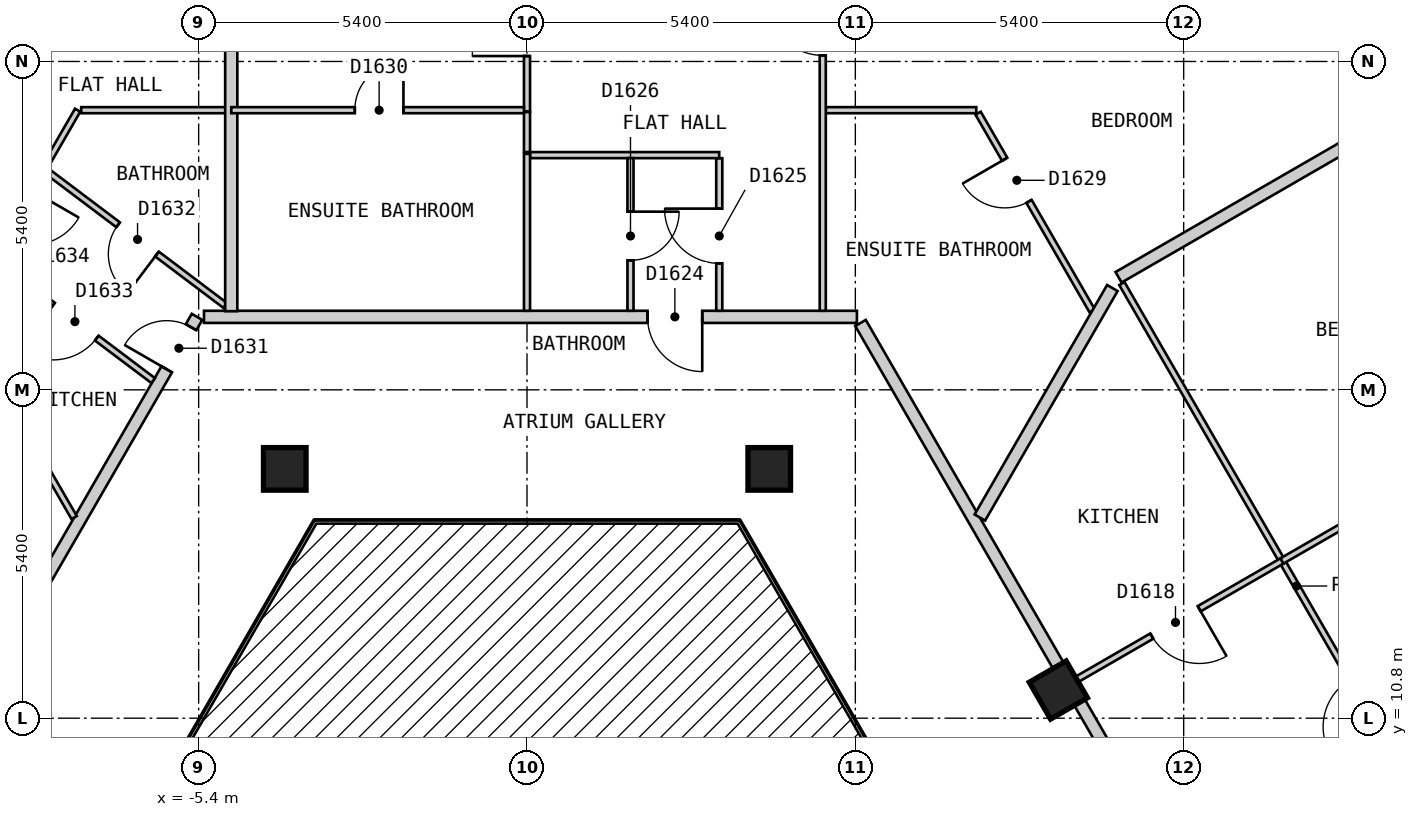
"""IFC4 building model, lengths in metres.
Left out: names, types, materials, properties, quantities, classifications, styles, units other than length and angle.
Written with IfcOpenShell. Run it as: python <this file> out.ifc"""

import sys

from ifc_helpers import new_model, si_unit, direction, frame, frame_2d, origin, origin_2d, place, context, subcontext, project, spatial, polyline, rectangle, outline, extrude, element, fill, save


model = new_model("IFC4")
c1 = context("Model", 3, precision=1e-05, world=origin(), true_north=direction((0.0, 1.0)))
c2 = subcontext(c1, "Body", "Model", "MODEL_VIEW")
j1 = project(units=[si_unit("LENGTHUNIT", "METRE"), si_unit("PLANEANGLEUNIT", "RADIAN")], contexts=[c1])
p1 = place(None, origin())
s1 = spatial("IfcSite", under=j1, at=p1, CompositionType="ELEMENT")
p2 = place(p1, origin())
s2 = spatial("IfcBuilding", under=s1, at=p2, CompositionType="ELEMENT")
p3 = place(p2, frame((0.0, 0.0, 169.2)))
s3 = spatial("IfcBuildingStorey", under=s2, at=p3, CompositionType="ELEMENT", Elevation=169.2)
for number, where, z_axis, x_axis in (
    (1, (8.739, 11.263, 0.0), (0.0, 0.0, 1.0), (-0.5, 0.866, 0.0)),
    (2, (3.984, 14.9, 0.0), (0.0, 0.0, 1.0), (1.0, 0.0, 0.0)),
    (3, (-3.984, 14.9, 0.0), (0.0, 0.0, 1.0), (1.0, 0.0, 0.0)),
):
    element("IfcColumn", number, at=place(p3, frame(where, z_axis=z_axis, x_axis=x_axis)), inside=s3, PredefinedType="COLUMN", context=c2, shape_type="SweptSolid", body=[
        extrude(rectangle(XDim=0.7, YDim=0.7, at=origin_2d()), origin(), (0.0, 0.0, 1.0), 3.0),
    ])
p4 = place(p3, frame((14.647, 21.57, 0.0), z_axis=(0.0, 0.0, 1.0), x_axis=(-0.866022959057, 0.500004234368, 0.0)))
e4 = element("IfcWall", 4, at=p4, inside=s3, PredefinedType="SOLIDWALL", context=c2, shape_type="SweptSolid", body=[
    extrude(outline(polyline([(0.0, -0.15), (5.0, -0.15), (4.92, 0.15), (0.08, 0.15), (0.0, -0.15)])), origin(), (0.0, 0.0, 1.0), 2.7),
])
p5 = place(p4, frame((0.65, 0.0, 0.15)))
e5 = element("IfcOpeningElement", 5, at=p5, cuts=e4, PredefinedType="OPENING", context=c2, shape_type="SweptSolid", body=[
    extrude(rectangle(XDim=1.2, YDim=2.1, at=frame_2d((0.6, 1.05))), frame((0.0, 0.16, 0.0), z_axis=(0.0, -1.0, 0.0), x_axis=(1.0, 0.0, 0.0)), (0.0, 0.0, 1.0), 0.32),
])
p6 = place(p3, frame((5.485, 17.3, 0.0), z_axis=(0.0, 0.0, 1.0), x_axis=(0.499965832213, -0.866045129667, 0.0)))
e6 = element("IfcWall", 6, at=p6, inside=s3, PredefinedType="PARTITIONING", context=c2, shape_type="SweptSolid", body=[
    extrude(rectangle(XDim=10.739, YDim=0.2, at=frame_2d((5.369, 0.0))), origin(), (0.0, 0.0, 1.0), 2.7),
])
p7 = place(p6, frame((9.047, 0.0, 0.0)))
e7 = element("IfcOpeningElement", 7, at=p7, cuts=e6, PredefinedType="OPENING", context=c2, shape_type="SweptSolid", body=[
    extrude(rectangle(XDim=1.0, YDim=2.1, at=frame_2d((0.5, 1.05))), frame((0.0, 0.11, 0.0), z_axis=(0.0, -1.0, 0.0), x_axis=(1.0, 0.0, 0.0)), (0.0, 0.0, 1.0), 0.22),
])
p8 = place(p3, frame((-5.312, 17.4, 0.0), z_axis=(0.0, 0.0, 1.0), x_axis=(1.0, 0.0, 0.0)))
e8 = element("IfcWall", 8, at=p8, inside=s3, PredefinedType="PARTITIONING", context=c2, shape_type="SweptSolid", body=[
    extrude(rectangle(XDim=10.738, YDim=0.2, at=frame_2d((5.369, 0.0))), origin(), (0.0, 0.0, 1.0), 2.7),
])
p9 = place(p8, frame((7.294, 0.0, 0.0)))
e9 = element("IfcOpeningElement", 9, at=p9, cuts=e8, PredefinedType="OPENING", context=c2, shape_type="SweptSolid", body=[
    extrude(rectangle(XDim=0.9, YDim=2.1, at=frame_2d((0.45, 1.05))), frame((0.0, 0.11, 0.0), z_axis=(0.0, -1.0, 0.0), x_axis=(1.0, 0.0, 0.0)), (0.0, 0.0, 1.0), 0.22),
])
p10 = place(p3, frame((-10.771, 8.144, 0.0), z_axis=(0.0, 0.0, 1.0), x_axis=(0.500008507724, 0.866020491792, 0.0)))
e10 = element("IfcWall", 10, at=p10, inside=s3, PredefinedType="PARTITIONING", context=c2, shape_type="SweptSolid", body=[
    extrude(rectangle(XDim=10.688, YDim=0.2, at=frame_2d((5.344, 0.0))), origin(), (0.0, 0.0, 1.0), 2.7),
])
p11 = place(p10, frame((9.692, 0.0, 0.0)))
e11 = element("IfcOpeningElement", 11, at=p11, cuts=e10, PredefinedType="OPENING", context=c2, shape_type="SweptSolid", body=[
    extrude(rectangle(XDim=0.8, YDim=2.1, at=frame_2d((0.4, 1.05))), frame((0.0, 0.11, 0.0), z_axis=(0.0, -1.0, 0.0), x_axis=(1.0, 0.0, 0.0)), (0.0, 0.0, 1.0), 0.22),
])
p12 = place(p10, frame((0.549, 0.0, 0.0)))
e12 = element("IfcOpeningElement", 12, at=p12, cuts=e10, PredefinedType="OPENING", context=c2, shape_type="SweptSolid", body=[
    extrude(rectangle(XDim=1.0, YDim=2.1, at=frame_2d((0.5, 1.05))), frame((0.0, 0.11, 0.0), z_axis=(0.0, -1.0, 0.0), x_axis=(1.0, 0.0, 0.0)), (0.0, 0.0, 1.0), 0.22),
])
p13 = place(p3, frame((7.419, 20.749, 0.0), z_axis=(0.0, 0.0, 1.0), x_axis=(0.499917691695, -0.866072919292, 0.0)))
e13 = element("IfcWall", 13, at=p13, inside=s3, PredefinedType="PARTITIONING", context=c2, shape_type="SweptSolid", body=[
    extrude(rectangle(XDim=3.753, YDim=0.1, at=frame_2d((1.876, 0.0))), origin(), (0.0, 0.0, 1.0), 2.7),
])
p14 = place(p13, frame((0.874, 0.0, 0.0)))
e14 = element("IfcOpeningElement", 14, at=p14, cuts=e13, PredefinedType="OPENING", context=c2, shape_type="SweptSolid", body=[
    extrude(rectangle(XDim=0.8, YDim=2.1, at=frame_2d((0.4, 1.05))), frame((0.0, 0.06, 0.0), z_axis=(0.0, -1.0, 0.0), x_axis=(1.0, 0.0, 0.0)), (0.0, 0.0, 1.0), 0.12),
])
p15 = place(p3, frame((9.784, 17.947, 0.0), z_axis=(0.0, 0.0, 1.0), x_axis=(0.500016228266, -0.866016034188, 0.0)))
e15 = element("IfcWall", 15, at=p15, inside=s3, PredefinedType="PARTITIONING", context=c2, shape_type="SweptSolid", body=[
    extrude(rectangle(XDim=11.486, YDim=0.1, at=frame_2d((5.743, 0.0))), origin(), (0.0, 0.0, 1.0), 2.7),
])
p16 = place(p15, frame((7.518, 0.0, 0.0)))
e16 = element("IfcOpeningElement", 16, at=p16, cuts=e15, PredefinedType="OPENING", context=c2, shape_type="SweptSolid", body=[
    extrude(rectangle(XDim=0.9, YDim=2.1, at=frame_2d((0.45, 1.05))), frame((0.0, 0.06, 0.0), z_axis=(0.0, -1.0, 0.0), x_axis=(1.0, 0.0, 0.0)), (0.0, 0.0, 1.0), 0.12),
])
p17 = place(p3, frame((0.0, 20.769, 0.0), z_axis=(0.0, 0.0, 1.0), x_axis=(0.0, -1.0, 0.0)))
e17 = element("IfcWall", 17, at=p17, inside=s3, PredefinedType="PARTITIONING", context=c2, shape_type="SweptSolid", body=[
    extrude(rectangle(XDim=0.659, YDim=0.1, at=frame_2d((0.33, 0.0))), origin(), (0.0, 0.0, 1.0), 2.7),
])
p18 = place(p3, frame((3.162, 20.009, 0.0), z_axis=(0.0, 0.0, 1.0), x_axis=(0.0, -1.0, 0.0)))
e18 = element("IfcWall", 18, at=p18, inside=s3, PredefinedType="PARTITIONING", context=c2, shape_type="SweptSolid", body=[
    extrude(rectangle(XDim=2.509, YDim=0.1, at=frame_2d((1.254, 0.0))), origin(), (0.0, 0.0, 1.0), 2.7),
])
p19 = place(p18, frame((0.829, 0.0, 0.0)))
e19 = element("IfcOpeningElement", 19, at=p19, cuts=e18, PredefinedType="OPENING", context=c2, shape_type="SweptSolid", body=[
    extrude(rectangle(XDim=0.9, YDim=2.1, at=frame_2d((0.45, 1.05))), frame((0.0, 0.06, 0.0), z_axis=(0.0, -1.0, 0.0), x_axis=(1.0, 0.0, 0.0)), (0.0, 0.0, 1.0), 0.12),
])
p20 = place(p3, frame((-8.763, 18.321, 0.0), z_axis=(0.0, 0.0, 1.0), x_axis=(0.798861914713, -0.601514456369, 0.0)))
e20 = element("IfcWall", 20, at=p20, inside=s3, PredefinedType="PARTITIONING", context=c2, shape_type="SweptSolid", body=[
    extrude(rectangle(XDim=3.273, YDim=0.1, at=frame_2d((1.637, 0.0))), origin(), (0.0, 0.0, 1.0), 2.7),
])
p21 = place(p20, frame((1.212, 0.0, 0.0)))
e21 = element("IfcOpeningElement", 21, at=p21, cuts=e20, PredefinedType="OPENING", context=c2, shape_type="SweptSolid", body=[
    extrude(rectangle(XDim=0.9, YDim=2.1, at=frame_2d((0.45, 1.05))), frame((0.0, 0.06, 0.0), z_axis=(0.0, -1.0, 0.0), x_axis=(1.0, 0.0, 0.0)), (0.0, 0.0, 1.0), 0.12),
])
p22 = place(p3, frame((-7.906, 19.804, 0.0), z_axis=(0.0, 0.0, 1.0), x_axis=(0.798741470056, -0.60167438371, 0.0)))
e22 = element("IfcWall", 22, at=p22, inside=s3, PredefinedType="PARTITIONING", context=c2, shape_type="SweptSolid", body=[
    extrude(rectangle(XDim=3.683, YDim=0.1, at=frame_2d((1.842, 0.0))), origin(), (0.0, 0.0, 1.0), 2.7),
])
p23 = place(p22, frame((1.479, 0.0, 0.0)))
e23 = element("IfcOpeningElement", 23, at=p23, cuts=e22, PredefinedType="OPENING", context=c2, shape_type="SweptSolid", body=[
    extrude(rectangle(XDim=0.8, YDim=2.1, at=frame_2d((0.4, 1.05))), frame((0.0, 0.06, 0.0), z_axis=(0.0, -1.0, 0.0), x_axis=(1.0, 0.0, 0.0)), (0.0, 0.0, 1.0), 0.12),
])
p24 = place(p3, frame((0.05, 20.06, 0.0), z_axis=(0.0, 0.0, 1.0), x_axis=(1.0, 0.0, 0.0)))
e24 = element("IfcWall", 24, at=p24, inside=s3, PredefinedType="PARTITIONING", context=c2, shape_type="SweptSolid", body=[
    extrude(rectangle(XDim=3.111, YDim=0.1, at=frame_2d((1.555, 0.0))), origin(), (0.0, 0.0, 1.0), 2.7),
])
p25 = place(p3, frame((-7.332, 20.799, 0.0), z_axis=(0.0, 0.0, 1.0), x_axis=(1.0, 0.0, 0.0)))
e25 = element("IfcWall", 25, at=p25, inside=s3, PredefinedType="PARTITIONING", context=c2, shape_type="SweptSolid", body=[
    extrude(rectangle(XDim=2.468, YDim=0.1, at=frame_2d((1.234, 0.0))), origin(), (0.0, 0.0, 1.0), 2.7),
])
p26 = place(p3, frame((4.914, 20.799, 0.0), z_axis=(0.0, 0.0, 1.0), x_axis=(1.0, 0.0, 0.0)))
e26 = element("IfcWall", 26, at=p26, inside=s3, PredefinedType="PARTITIONING", context=c2, shape_type="SweptSolid", body=[
    extrude(rectangle(XDim=2.475, YDim=0.1, at=frame_2d((1.237, 0.0))), origin(), (0.0, 0.0, 1.0), 2.7),
])
p27 = place(p3, frame((-11.806, 13.149, 0.0), z_axis=(0.0, 0.0, 1.0), x_axis=(0.499932199895, 0.866064544655, 0.0)))
e27 = element("IfcWall", 27, at=p27, inside=s3, PredefinedType="PARTITIONING", context=c2, shape_type="SweptSolid", body=[
    extrude(rectangle(XDim=8.833, YDim=0.1, at=frame_2d((4.417, 0.0))), origin(), (0.0, 0.0, 1.0), 2.7),
])
p28 = place(p27, frame((6.413, 0.0, 0.0)))
e28 = element("IfcOpeningElement", 28, at=p28, cuts=e27, PredefinedType="OPENING", context=c2, shape_type="SweptSolid", body=[
    extrude(rectangle(XDim=0.9, YDim=2.1, at=frame_2d((0.45, 1.05))), frame((0.0, 0.06, 0.0), z_axis=(0.0, -1.0, 0.0), x_axis=(1.0, 0.0, 0.0)), (0.0, 0.0, 1.0), 0.12),
])
p29 = place(p27, frame((2.004, 0.0, 0.0)))
e29 = element("IfcOpeningElement", 29, at=p29, cuts=e27, PredefinedType="OPENING", context=c2, shape_type="SweptSolid", body=[
    extrude(rectangle(XDim=0.8, YDim=2.1, at=frame_2d((0.4, 1.05))), frame((0.0, 0.06, 0.0), z_axis=(0.0, -1.0, 0.0), x_axis=(1.0, 0.0, 0.0)), (0.0, 0.0, 1.0), 0.12),
])
p30 = place(p3, frame((4.864, 17.5, 0.0), z_axis=(0.0, 0.0, 1.0), x_axis=(0.0, 1.0, 0.0)))
e30 = element("IfcWall", 30, at=p30, inside=s3, PredefinedType="PARTITIONING", context=c2, shape_type="SweptSolid", body=[
    extrude(rectangle(XDim=6.4, YDim=0.1, at=frame_2d((3.2, 0.0))), origin(), (0.0, 0.0, 1.0), 2.7),
])
p31 = place(p30, frame((4.2, 0.0, 0.0)))
e31 = element("IfcOpeningElement", 31, at=p31, cuts=e30, PredefinedType="OPENING", context=c2, shape_type="SweptSolid", body=[
    extrude(rectangle(XDim=0.9, YDim=2.1, at=frame_2d((0.45, 1.05))), frame((0.0, 0.06, 0.0), z_axis=(0.0, -1.0, 0.0), x_axis=(1.0, 0.0, 0.0)), (0.0, 0.0, 1.0), 0.12),
])
p32 = place(p3, frame((1.702, 17.5, 0.0), z_axis=(0.0, 0.0, 1.0), x_axis=(0.0, 1.0, 0.0)))
e32 = element("IfcWall", 32, at=p32, inside=s3, PredefinedType="PARTITIONING", context=c2, shape_type="SweptSolid", body=[
    extrude(rectangle(XDim=2.51, YDim=0.1, at=frame_2d((1.255, 0.0))), origin(), (0.0, 0.0, 1.0), 2.7),
])
p33 = place(p32, frame((0.83, 0.0, 0.0)))
e33 = element("IfcOpeningElement", 33, at=p33, cuts=e32, PredefinedType="OPENING", context=c2, shape_type="SweptSolid", body=[
    extrude(rectangle(XDim=0.8, YDim=2.1, at=frame_2d((0.4, 1.05))), frame((0.0, 0.06, 0.0), z_axis=(0.0, -1.0, 0.0), x_axis=(1.0, 0.0, 0.0)), (0.0, 0.0, 1.0), 0.12),
])
p34 = place(p3, frame((0.0, 17.5, 0.0), z_axis=(0.0, 0.0, 1.0), x_axis=(0.0, 1.0, 0.0)))
e34 = element("IfcWall", 34, at=p34, inside=s3, PredefinedType="PARTITIONING", context=c2, shape_type="SweptSolid", body=[
    extrude(rectangle(XDim=2.58, YDim=0.1, at=frame_2d((1.29, 0.0))), origin(), (0.0, 0.0, 1.0), 2.7),
])
p35 = place(p3, frame((0.0, 20.779, 0.0), z_axis=(0.0, 0.0, 1.0), x_axis=(0.0, 1.0, 0.0)))
e35 = element("IfcWall", 35, at=p35, inside=s3, PredefinedType="PARTITIONING", context=c2, shape_type="SweptSolid", body=[
    extrude(rectangle(XDim=3.121, YDim=0.1, at=frame_2d((1.561, 0.0))), origin(), (0.0, 0.0, 1.0), 2.7),
])
p36 = place(p35, frame((0.91, 0.0, 0.0)))
e36 = element("IfcOpeningElement", 36, at=p36, cuts=e35, PredefinedType="OPENING", context=c2, shape_type="SweptSolid", body=[
    extrude(rectangle(XDim=0.9, YDim=2.1, at=frame_2d((0.45, 1.05))), frame((0.0, 0.06, 0.0), z_axis=(0.0, -1.0, 0.0), x_axis=(1.0, 0.0, 0.0)), (0.0, 0.0, 1.0), 0.12),
])
p37 = place(p3, frame((8.999, 11.413, 0.0), z_axis=(0.0, 0.0, 1.0), x_axis=(0.866076396086, 0.499911668341, 0.0)))
e37 = element("IfcWall", 37, at=p37, inside=s3, PredefinedType="PARTITIONING", context=c2, shape_type="SweptSolid", body=[
    extrude(rectangle(XDim=3.947, YDim=0.1, at=frame_2d((1.973, 0.0))), origin(), (0.0, 0.0, 1.0), 2.7),
])
p38 = place(p37, frame((1.474, 0.0, 0.0)))
e38 = element("IfcOpeningElement", 38, at=p38, cuts=e37, PredefinedType="OPENING", context=c2, shape_type="SweptSolid", body=[
    extrude(rectangle(XDim=0.9, YDim=2.1, at=frame_2d((0.45, 1.05))), frame((0.0, 0.06, 0.0), z_axis=(0.0, -1.0, 0.0), x_axis=(1.0, 0.0, 0.0)), (0.0, 0.0, 1.0), 0.12),
])
p39 = place(p3, frame((7.448, 14.1, 0.0), z_axis=(0.0, 0.0, 1.0), x_axis=(0.500013426303, 0.866017651966, 0.0)))
e39 = element("IfcWall", 39, at=p39, inside=s3, PredefinedType="PARTITIONING", context=c2, shape_type="SweptSolid", body=[
    extrude(rectangle(XDim=4.358, YDim=0.2, at=frame_2d((2.179, 0.0))), origin(), (0.0, 0.0, 1.0), 2.7),
])
p40 = place(p3, frame((-4.864, 17.493, 0.0), z_axis=(0.0, 0.0, 1.0), x_axis=(0.0, 1.0, 0.0)))
e40 = element("IfcWall", 40, at=p40, inside=s3, PredefinedType="PARTITIONING", context=c2, shape_type="SweptSolid", body=[
    extrude(rectangle(XDim=6.407, YDim=0.2, at=frame_2d((3.204, 0.0))), origin(), (0.0, 0.0, 1.0), 2.7),
])
p41 = place(p3, frame((9.729, 18.051, 0.0), z_axis=(0.0, 0.0, 1.0), x_axis=(0.866038213712, 0.499977811898, 0.0)))
e41 = element("IfcWall", 41, at=p41, inside=s3, PredefinedType="PARTITIONING", context=c2, shape_type="SweptSolid", body=[
    extrude(rectangle(XDim=5.848, YDim=0.2, at=frame_2d((2.924, 0.0))), origin(), (0.0, 0.0, 1.0), 2.7),
])
p42 = place(p3, frame((-9.352, 17.4, 0.0), z_axis=(0.0, 0.0, 1.0), x_axis=(0.499785326313, -0.866149310225, 0.0)))
e42 = element("IfcWall", 42, at=p42, inside=s3, PredefinedType="PARTITIONING", context=c2, shape_type="SweptSolid", body=[
    extrude(rectangle(XDim=3.81, YDim=0.1, at=frame_2d((1.905, 0.0))), origin(), (0.0, 0.0, 1.0), 2.7),
])
p43 = place(p3, frame((12.417, 13.386, 0.0), z_axis=(0.0, 0.0, 1.0), x_axis=(0.86599873886, 0.50004618216, 0.0)))
e43 = element("IfcWall", 43, at=p43, inside=s3, PredefinedType="PARTITIONING", context=c2, shape_type="SweptSolid", body=[
    extrude(rectangle(XDim=5.854, YDim=0.1, at=frame_2d((2.927, 0.0))), origin(), (0.0, 0.0, 1.0), 2.7),
])
p44 = place(p43, frame((2.476, 0.0, 0.0)))
e44 = element("IfcOpeningElement", 44, at=p44, cuts=e43, PredefinedType="OPENING", context=c2, shape_type="SweptSolid", body=[
    extrude(rectangle(XDim=0.9, YDim=2.1, at=frame_2d((0.45, 1.05))), frame((0.0, 0.06, 0.0), z_axis=(0.0, -1.0, 0.0), x_axis=(1.0, 0.0, 0.0)), (0.0, 0.0, 1.0), 0.12),
])
p45 = place(p3, frame((-4.864, 20.799, 0.0), z_axis=(0.0, 0.0, 1.0), x_axis=(1.0, 0.0, 0.0)))
e45 = element("IfcWall", 45, at=p45, inside=s3, PredefinedType="PARTITIONING", context=c2, shape_type="SweptSolid", body=[
    extrude(rectangle(XDim=4.814, YDim=0.1, at=frame_2d((2.407, 0.0))), origin(), (0.0, 0.0, 1.0), 2.7),
])
p46 = place(p45, frame((2.032, 0.0, 0.0)))
e46 = element("IfcOpeningElement", 46, at=p46, cuts=e45, PredefinedType="OPENING", context=c2, shape_type="SweptSolid", body=[
    extrude(rectangle(XDim=0.8, YDim=2.1, at=frame_2d((0.4, 1.05))), frame((0.0, 0.06, 0.0), z_axis=(0.0, -1.0, 0.0), x_axis=(1.0, 0.0, 0.0)), (0.0, 0.0, 1.0), 0.12),
])
p47 = place(p38, origin())
e47 = element("IfcDoor", 47, at=p47, inside=s3, OperationType="SINGLE_SWING_RIGHT", PredefinedType="DOOR", context=c2, shape_type="SweptSolid", body=[
    extrude(rectangle(XDim=0.9, YDim=2.1, at=frame_2d((0.45, 1.05))), frame((0.0, 0.025, 0.0), z_axis=(0.0, -1.0, 0.0), x_axis=(1.0, 0.0, 0.0)), (0.0, 0.0, 1.0), 0.05),
])
fill(e38, e47)
p48 = place(p9, origin())
e48 = element("IfcDoor", 48, at=p48, inside=s3, OperationType="SINGLE_SWING_RIGHT", PredefinedType="DOOR", context=c2, shape_type="SweptSolid", body=[
    extrude(rectangle(XDim=0.9, YDim=2.1, at=frame_2d((0.45, 1.05))), frame((0.0, 0.025, 0.0), z_axis=(0.0, -1.0, 0.0), x_axis=(1.0, 0.0, 0.0)), (0.0, 0.0, 1.0), 0.05),
])
fill(e9, e48)
p49 = place(p19, origin())
e49 = element("IfcDoor", 49, at=p49, inside=s3, OperationType="SINGLE_SWING_LEFT", PredefinedType="DOOR", context=c2, shape_type="SweptSolid", body=[
    extrude(rectangle(XDim=0.9, YDim=2.1, at=frame_2d((0.45, 1.05))), frame((0.0, 0.025, 0.0), z_axis=(0.0, -1.0, 0.0), x_axis=(1.0, 0.0, 0.0)), (0.0, 0.0, 1.0), 0.05),
])
fill(e19, e49)
p50 = place(p33, origin())
e50 = element("IfcDoor", 50, at=p50, inside=s3, OperationType="SINGLE_SWING_RIGHT", PredefinedType="DOOR", context=c2, shape_type="SweptSolid", body=[
    extrude(rectangle(XDim=0.8, YDim=2.1, at=frame_2d((0.4, 1.05))), frame((0.0, 0.025, 0.0), z_axis=(0.0, -1.0, 0.0), x_axis=(1.0, 0.0, 0.0)), (0.0, 0.0, 1.0), 0.05),
])
fill(e33, e50)
p51 = place(p36, origin())
e51 = element("IfcDoor", 51, at=p51, inside=s3, OperationType="SINGLE_SWING_LEFT", PredefinedType="DOOR", context=c2, shape_type="SweptSolid", body=[
    extrude(rectangle(XDim=0.9, YDim=2.1, at=frame_2d((0.45, 1.05))), frame((0.0, 0.025, 0.0), z_axis=(0.0, -1.0, 0.0), x_axis=(1.0, 0.0, 0.0)), (0.0, 0.0, 1.0), 0.05),
])
fill(e36, e51)
p52 = place(p31, origin())
e52 = element("IfcDoor", 52, at=p52, inside=s3, OperationType="SINGLE_SWING_RIGHT", PredefinedType="DOOR", context=c2, shape_type="SweptSolid", body=[
    extrude(rectangle(XDim=0.9, YDim=2.1, at=frame_2d((0.45, 1.05))), frame((0.0, 0.025, 0.0), z_axis=(0.0, -1.0, 0.0), x_axis=(1.0, 0.0, 0.0)), (0.0, 0.0, 1.0), 0.05),
])
fill(e31, e52)
p53 = place(p14, origin())
e53 = element("IfcDoor", 53, at=p53, inside=s3, OperationType="SINGLE_SWING_LEFT", PredefinedType="DOOR", context=c2, shape_type="SweptSolid", body=[
    extrude(rectangle(XDim=0.8, YDim=2.1, at=frame_2d((0.4, 1.05))), frame((0.0, 0.025, 0.0), z_axis=(0.0, -1.0, 0.0), x_axis=(1.0, 0.0, 0.0)), (0.0, 0.0, 1.0), 0.05),
])
fill(e14, e53)
p54 = place(p46, origin())
e54 = element("IfcDoor", 54, at=p54, inside=s3, OperationType="SINGLE_SWING_RIGHT", PredefinedType="DOOR", context=c2, shape_type="SweptSolid", body=[
    extrude(rectangle(XDim=0.8, YDim=2.1, at=frame_2d((0.4, 1.05))), frame((0.0, 0.025, 0.0), z_axis=(0.0, -1.0, 0.0), x_axis=(1.0, 0.0, 0.0)), (0.0, 0.0, 1.0), 0.05),
])
fill(e46, e54)
p55 = place(p11, origin())
e55 = element("IfcDoor", 55, at=p55, inside=s3, OperationType="SINGLE_SWING_LEFT", PredefinedType="DOOR", context=c2, shape_type="SweptSolid", body=[
    extrude(rectangle(XDim=0.8, YDim=2.1, at=frame_2d((0.4, 1.05))), frame((0.0, 0.025, 0.0), z_axis=(0.0, -1.0, 0.0), x_axis=(1.0, 0.0, 0.0)), (0.0, 0.0, 1.0), 0.05),
])
fill(e11, e55)
p56 = place(p23, origin())
e56 = element("IfcDoor", 56, at=p56, inside=s3, OperationType="SINGLE_SWING_RIGHT", PredefinedType="DOOR", context=c2, shape_type="SweptSolid", body=[
    extrude(rectangle(XDim=0.8, YDim=2.1, at=frame_2d((0.4, 1.05))), frame((0.0, 0.025, 0.0), z_axis=(0.0, -1.0, 0.0), x_axis=(1.0, 0.0, 0.0)), (0.0, 0.0, 1.0), 0.05),
])
fill(e23, e56)
p57 = place(p21, origin())
e57 = element("IfcDoor", 57, at=p57, inside=s3, OperationType="SINGLE_SWING_LEFT", PredefinedType="DOOR", context=c2, shape_type="SweptSolid", body=[
    extrude(rectangle(XDim=0.9, YDim=2.1, at=frame_2d((0.45, 1.05))), frame((0.0, 0.025, 0.0), z_axis=(0.0, -1.0, 0.0), x_axis=(1.0, 0.0, 0.0)), (0.0, 0.0, 1.0), 0.05),
])
fill(e21, e57)
save(model, sys.argv[1])
